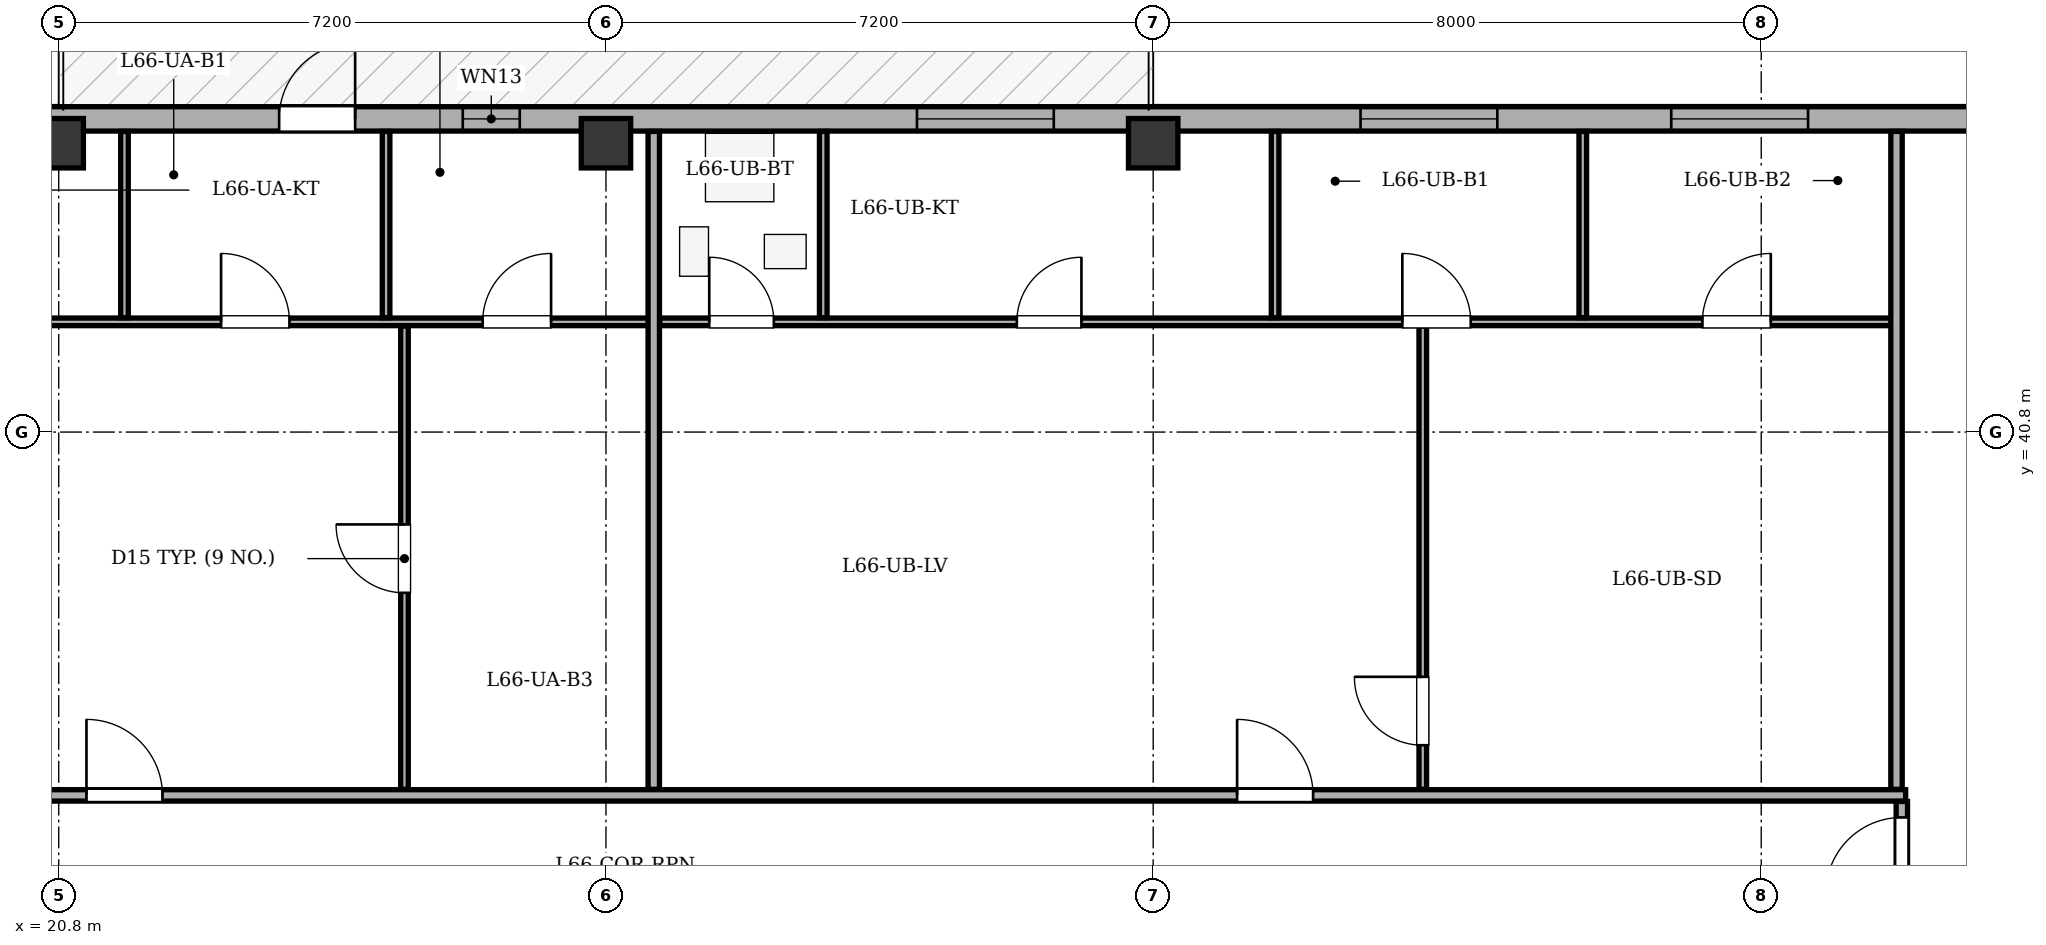
"""IFC4 building model, lengths in metres.
Left out: names, types, materials, properties, quantities, classifications, styles, units other than length and angle.
Written with IfcOpenShell. Run it as: python <this file> out.ifc"""

import sys

from ifc_helpers import new_model, si_unit, direction, frame, frame_2d, origin, origin_2d, place, context, subcontext, project, spatial, rectangle, extrude, element, fill, save


model = new_model("IFC4")
c1 = context("Model", 3, precision=1e-05, world=origin(), true_north=direction((0.0, 1.0)))
c2 = subcontext(c1, "Body", "Model", "MODEL_VIEW")
j1 = project(units=[si_unit("LENGTHUNIT", "METRE"), si_unit("PLANEANGLEUNIT", "RADIAN")], contexts=[c1])
p1 = place(None, origin())
s1 = spatial("IfcSite", under=j1, at=p1, CompositionType="ELEMENT")
p2 = place(p1, origin())
s2 = spatial("IfcBuilding", under=s1, at=p2, CompositionType="ELEMENT")
p3 = place(p2, frame((0.0, 0.0, 251.7)))
s3 = spatial("IfcBuildingStorey", under=s2, at=p3, CompositionType="ELEMENT", Elevation=251.7)
for number, where, z_axis, x_axis in (
    (1, (20.8, 44.6, 0.0), (0.0, 0.0, 1.0), (1.0, 0.0, 0.0)),
    (2, (28.0, 44.6, 0.0), (0.0, 0.0, 1.0), (1.0, 0.0, 0.0)),
    (3, (35.2, 44.6, 0.0), (0.0, 0.0, 1.0), (1.0, 0.0, 0.0)),
):
    element("IfcColumn", number, at=place(p3, frame(where, z_axis=z_axis, x_axis=x_axis)), inside=s3, PredefinedType="COLUMN", context=c2, shape_type="SweptSolid", body=[
        extrude(rectangle(XDim=0.65, YDim=0.65, at=origin_2d()), origin(), (0.0, 0.0, 1.0), 3.4),
    ])
p4 = place(p3, frame((14.7, 44.92, 0.0), z_axis=(0.0, 0.0, 1.0), x_axis=(1.0, 0.0, 0.0)))
e4 = element("IfcWall", 4, at=p4, inside=s3, PredefinedType="STANDARD", context=c2, shape_type="SweptSolid", body=[
    extrude(rectangle(XDim=37.0, YDim=0.32, at=frame_2d((18.5, 0.0))), origin(), (0.0, 0.0, 1.0), 2.725),
])
p5 = place(p4, frame((9.0, 0.0, 0.0)))
e5 = element("IfcOpeningElement", 5, at=p5, cuts=e4, PredefinedType="OPENING", context=c2, shape_type="SweptSolid", body=[
    extrude(rectangle(XDim=1.0, YDim=2.02, at=frame_2d((0.5, 1.01))), frame((0.0, 0.17, 0.0), z_axis=(0.0, -1.0, 0.0), x_axis=(1.0, 0.0, 0.0)), (0.0, 0.0, 1.0), 0.34),
])
p6 = place(p4, frame((3.228, 0.0, 0.75)))
e6 = element("IfcOpeningElement", 6, at=p6, cuts=e4, PredefinedType="OPENING", context=c2, shape_type="SweptSolid", body=[
    extrude(rectangle(XDim=1.8, YDim=1.7, at=frame_2d((0.9, 0.85))), frame((0.0, 0.17, 0.0), z_axis=(0.0, -1.0, 0.0), x_axis=(1.0, 0.0, 0.0)), (0.0, 0.0, 1.0), 0.34),
])
p7 = place(p4, frame((17.392, 0.0, 0.75)))
e7 = element("IfcOpeningElement", 7, at=p7, cuts=e4, PredefinedType="OPENING", context=c2, shape_type="SweptSolid", body=[
    extrude(rectangle(XDim=1.8, YDim=1.7, at=frame_2d((0.9, 0.85))), frame((0.0, 0.17, 0.0), z_axis=(0.0, -1.0, 0.0), x_axis=(1.0, 0.0, 0.0)), (0.0, 0.0, 1.0), 0.34),
])
p8 = place(p4, frame((23.228, 0.0, 0.75)))
e8 = element("IfcOpeningElement", 8, at=p8, cuts=e4, PredefinedType="OPENING", context=c2, shape_type="SweptSolid", body=[
    extrude(rectangle(XDim=1.8, YDim=1.7, at=frame_2d((0.9, 0.85))), frame((0.0, 0.17, 0.0), z_axis=(0.0, -1.0, 0.0), x_axis=(1.0, 0.0, 0.0)), (0.0, 0.0, 1.0), 0.34),
])
p9 = place(p4, frame((27.316, 0.0, 0.75)))
e9 = element("IfcOpeningElement", 9, at=p9, cuts=e4, PredefinedType="OPENING", context=c2, shape_type="SweptSolid", body=[
    extrude(rectangle(XDim=1.8, YDim=1.7, at=frame_2d((0.9, 0.85))), frame((0.0, 0.17, 0.0), z_axis=(0.0, -1.0, 0.0), x_axis=(1.0, 0.0, 0.0)), (0.0, 0.0, 1.0), 0.34),
])
p10 = place(p4, frame((31.315, 0.0, 0.75)))
e10 = element("IfcOpeningElement", 10, at=p10, cuts=e4, PredefinedType="OPENING", context=c2, shape_type="SweptSolid", body=[
    extrude(rectangle(XDim=1.8, YDim=1.7, at=frame_2d((0.9, 0.85))), frame((0.0, 0.17, 0.0), z_axis=(0.0, -1.0, 0.0), x_axis=(1.0, 0.0, 0.0)), (0.0, 0.0, 1.0), 0.34),
])
p11 = place(p4, frame((33.965, 0.0, 0.75)))
e11 = element("IfcOpeningElement", 11, at=p11, cuts=e4, PredefinedType="OPENING", context=c2, shape_type="SweptSolid", body=[
    extrude(rectangle(XDim=1.8, YDim=1.7, at=frame_2d((0.9, 0.85))), frame((0.0, 0.17, 0.0), z_axis=(0.0, -1.0, 0.0), x_axis=(1.0, 0.0, 0.0)), (0.0, 0.0, 1.0), 0.34),
])
p12 = place(p4, frame((11.416, 0.0, 0.75)))
e12 = element("IfcOpeningElement", 12, at=p12, cuts=e4, PredefinedType="OPENING", context=c2, shape_type="SweptSolid", body=[
    extrude(rectangle(XDim=0.75, YDim=1.45, at=frame_2d((0.375, 0.725))), frame((0.0, 0.17, 0.0), z_axis=(0.0, -1.0, 0.0), x_axis=(1.0, 0.0, 0.0)), (0.0, 0.0, 1.0), 0.34),
])
p13 = place(p3, frame((14.58, 36.02, 0.0), z_axis=(0.0, 0.0, 1.0), x_axis=(1.0, 0.0, 0.0)))
e13 = element("IfcWall", 13, at=p13, inside=s3, PredefinedType="PARTITIONING", context=c2, shape_type="SweptSolid", body=[
    extrude(rectangle(XDim=30.52, YDim=0.15, at=frame_2d((15.26, 0.0))), origin(), (0.0, 0.0, 1.0), 3.1),
])
p14 = place(p13, frame((6.585, 0.0, 0.0)))
e14 = element("IfcOpeningElement", 14, at=p14, cuts=e13, PredefinedType="OPENING", context=c2, shape_type="SweptSolid", body=[
    extrude(rectangle(XDim=1.0, YDim=2.1, at=frame_2d((0.5, 1.05))), frame((0.0, 0.085, 0.0), z_axis=(0.0, -1.0, 0.0), x_axis=(1.0, 0.0, 0.0)), (0.0, 0.0, 1.0), 0.17),
])
p15 = place(p13, frame((21.724, 0.0, 0.0)))
e15 = element("IfcOpeningElement", 15, at=p15, cuts=e13, PredefinedType="OPENING", context=c2, shape_type="SweptSolid", body=[
    extrude(rectangle(XDim=1.0, YDim=2.1, at=frame_2d((0.5, 1.05))), frame((0.0, 0.085, 0.0), z_axis=(0.0, -1.0, 0.0), x_axis=(1.0, 0.0, 0.0)), (0.0, 0.0, 1.0), 0.17),
])
p16 = place(p3, frame((14.78, 42.25, 0.0), z_axis=(0.0, 0.0, 1.0), x_axis=(1.0, 0.0, 0.0)))
e16 = element("IfcWall", 16, at=p16, inside=s3, PredefinedType="PARTITIONING", context=c2, shape_type="SweptSolid", body=[
    extrude(rectangle(XDim=13.889, YDim=0.1, at=frame_2d((6.944, 0.0))), origin(), (0.0, 0.0, 1.0), 3.1),
])
p17 = place(p16, frame((0.65, 0.0, 0.0)))
e17 = element("IfcOpeningElement", 17, at=p17, cuts=e16, PredefinedType="OPENING", context=c2, shape_type="SweptSolid", body=[
    extrude(rectangle(XDim=0.85, YDim=2.05, at=frame_2d((0.425, 1.025))), frame((0.0, 0.06, 0.0), z_axis=(0.0, -1.0, 0.0), x_axis=(1.0, 0.0, 0.0)), (0.0, 0.0, 1.0), 0.12),
])
p18 = place(p16, frame((4.093, 0.0, 0.0)))
e18 = element("IfcOpeningElement", 18, at=p18, cuts=e16, PredefinedType="OPENING", context=c2, shape_type="SweptSolid", body=[
    extrude(rectangle(XDim=0.85, YDim=2.05, at=frame_2d((0.425, 1.025))), frame((0.0, 0.06, 0.0), z_axis=(0.0, -1.0, 0.0), x_axis=(1.0, 0.0, 0.0)), (0.0, 0.0, 1.0), 0.12),
])
p19 = place(p16, frame((8.156, 0.0, 0.0)))
e19 = element("IfcOpeningElement", 19, at=p19, cuts=e16, PredefinedType="OPENING", context=c2, shape_type="SweptSolid", body=[
    extrude(rectangle(XDim=0.9, YDim=2.05, at=frame_2d((0.45, 1.025))), frame((0.0, 0.06, 0.0), z_axis=(0.0, -1.0, 0.0), x_axis=(1.0, 0.0, 0.0)), (0.0, 0.0, 1.0), 0.12),
])
p20 = place(p16, frame((11.598, 0.0, 0.0)))
e20 = element("IfcOpeningElement", 20, at=p20, cuts=e16, PredefinedType="OPENING", context=c2, shape_type="SweptSolid", body=[
    extrude(rectangle(XDim=0.9, YDim=2.05, at=frame_2d((0.45, 1.025))), frame((0.0, 0.06, 0.0), z_axis=(0.0, -1.0, 0.0), x_axis=(1.0, 0.0, 0.0)), (0.0, 0.0, 1.0), 0.12),
])
p21 = place(p3, frame((25.349, 36.1, 0.0), z_axis=(0.0, 0.0, 1.0), x_axis=(0.0, 1.0, 0.0)))
e21 = element("IfcWall", 21, at=p21, inside=s3, PredefinedType="PARTITIONING", context=c2, shape_type="SweptSolid", body=[
    extrude(rectangle(XDim=6.095, YDim=0.1, at=frame_2d((3.047, 0.0))), origin(), (0.0, 0.0, 1.0), 3.1),
])
p22 = place(p21, frame((2.585, 0.0, 0.0)))
e22 = element("IfcOpeningElement", 22, at=p22, cuts=e21, PredefinedType="OPENING", context=c2, shape_type="SweptSolid", body=[
    extrude(rectangle(XDim=0.9, YDim=2.05, at=frame_2d((0.45, 1.025))), frame((0.0, 0.06, 0.0), z_axis=(0.0, -1.0, 0.0), x_axis=(1.0, 0.0, 0.0)), (0.0, 0.0, 1.0), 0.12),
])
for number, where, z_axis, x_axis in (
    (23, (21.665, 42.305, 0.0), (0.0, 0.0, 1.0), (0.0, 1.0, 0.0)),
    (24, (25.107, 42.305, 0.0), (0.0, 0.0, 1.0), (0.0, 1.0, 0.0)),
):
    element("IfcWall", number, at=place(p3, frame(where, z_axis=z_axis, x_axis=x_axis)), inside=s3, PredefinedType="PARTITIONING", context=c2, shape_type="SweptSolid", body=[
        extrude(rectangle(XDim=2.45, YDim=0.1, at=frame_2d((1.225, 0.0))), origin(), (0.0, 0.0, 1.0), 3.1),
    ])
p23 = place(p3, frame((28.629, 36.1, 0.0), z_axis=(0.0, 0.0, 1.0), x_axis=(0.0, 1.0, 0.0)))
e25 = element("IfcWall", 25, at=p23, inside=s3, PredefinedType="PARTITIONING", context=c2, shape_type="SweptSolid", body=[
    extrude(rectangle(XDim=8.655, YDim=0.15, at=frame_2d((4.327, 0.0))), origin(), (0.0, 0.0, 1.0), 3.1),
])
p24 = place(p3, frame((28.709, 42.25, 0.0), z_axis=(0.0, 0.0, 1.0), x_axis=(1.0, 0.0, 0.0)))
e26 = element("IfcWall", 26, at=p24, inside=s3, PredefinedType="PARTITIONING", context=c2, shape_type="SweptSolid", body=[
    extrude(rectangle(XDim=16.311, YDim=0.1, at=frame_2d((8.156, 0.0))), origin(), (0.0, 0.0, 1.0), 3.1),
])
p25 = place(p24, frame((0.65, 0.0, 0.0)))
e27 = element("IfcOpeningElement", 27, at=p25, cuts=e26, PredefinedType="OPENING", context=c2, shape_type="SweptSolid", body=[
    extrude(rectangle(XDim=0.85, YDim=2.05, at=frame_2d((0.425, 1.025))), frame((0.0, 0.06, 0.0), z_axis=(0.0, -1.0, 0.0), x_axis=(1.0, 0.0, 0.0)), (0.0, 0.0, 1.0), 0.12),
])
p26 = place(p24, frame((4.697, 0.0, 0.0)))
e28 = element("IfcOpeningElement", 28, at=p26, cuts=e26, PredefinedType="OPENING", context=c2, shape_type="SweptSolid", body=[
    extrude(rectangle(XDim=0.85, YDim=2.05, at=frame_2d((0.425, 1.025))), frame((0.0, 0.06, 0.0), z_axis=(0.0, -1.0, 0.0), x_axis=(1.0, 0.0, 0.0)), (0.0, 0.0, 1.0), 0.12),
])
p27 = place(p24, frame((9.769, 0.0, 0.0)))
e29 = element("IfcOpeningElement", 29, at=p27, cuts=e26, PredefinedType="OPENING", context=c2, shape_type="SweptSolid", body=[
    extrude(rectangle(XDim=0.9, YDim=2.05, at=frame_2d((0.45, 1.025))), frame((0.0, 0.06, 0.0), z_axis=(0.0, -1.0, 0.0), x_axis=(1.0, 0.0, 0.0)), (0.0, 0.0, 1.0), 0.12),
])
p28 = place(p24, frame((13.717, 0.0, 0.0)))
e30 = element("IfcOpeningElement", 30, at=p28, cuts=e26, PredefinedType="OPENING", context=c2, shape_type="SweptSolid", body=[
    extrude(rectangle(XDim=0.9, YDim=2.05, at=frame_2d((0.45, 1.025))), frame((0.0, 0.06, 0.0), z_axis=(0.0, -1.0, 0.0), x_axis=(1.0, 0.0, 0.0)), (0.0, 0.0, 1.0), 0.12),
])
p29 = place(p3, frame((38.747, 36.1, 0.0), z_axis=(0.0, 0.0, 1.0), x_axis=(0.0, 1.0, 0.0)))
e31 = element("IfcWall", 31, at=p29, inside=s3, PredefinedType="PARTITIONING", context=c2, shape_type="SweptSolid", body=[
    extrude(rectangle(XDim=6.095, YDim=0.1, at=frame_2d((3.047, 0.0))), origin(), (0.0, 0.0, 1.0), 3.1),
])
p30 = place(p29, frame((0.58, 0.0, 0.0)))
e32 = element("IfcOpeningElement", 32, at=p30, cuts=e31, PredefinedType="OPENING", context=c2, shape_type="SweptSolid", body=[
    extrude(rectangle(XDim=0.9, YDim=2.05, at=frame_2d((0.45, 1.025))), frame((0.0, 0.06, 0.0), z_axis=(0.0, -1.0, 0.0), x_axis=(1.0, 0.0, 0.0)), (0.0, 0.0, 1.0), 0.12),
])
for number, where, z_axis, x_axis in (
    (33, (30.859, 42.305, 0.0), (0.0, 0.0, 1.0), (0.0, 1.0, 0.0)),
    (34, (36.804, 42.305, 0.0), (0.0, 0.0, 1.0), (0.0, 1.0, 0.0)),
    (35, (40.852, 42.305, 0.0), (0.0, 0.0, 1.0), (0.0, 1.0, 0.0)),
):
    element("IfcWall", number, at=place(p3, frame(where, z_axis=z_axis, x_axis=x_axis)), inside=s3, PredefinedType="PARTITIONING", context=c2, shape_type="SweptSolid", body=[
        extrude(rectangle(XDim=2.45, YDim=0.1, at=frame_2d((1.225, 0.0))), origin(), (0.0, 0.0, 1.0), 3.1),
    ])
p31 = place(p3, frame((44.98, 36.1, 0.0), z_axis=(0.0, 0.0, 1.0), x_axis=(0.0, 1.0, 0.0)))
e36 = element("IfcWall", 36, at=p31, inside=s3, PredefinedType="PARTITIONING", context=c2, shape_type="SweptSolid", body=[
    extrude(rectangle(XDim=8.655, YDim=0.15, at=frame_2d((4.327, 0.0))), origin(), (0.0, 0.0, 1.0), 2.725),
])
p32 = place(p3, frame((45.05, 34.15, 0.0), z_axis=(0.0, 0.0, 1.0), x_axis=(0.0, 1.0, 0.0)))
e37 = element("IfcWall", 37, at=p32, inside=s3, PredefinedType="PARTITIONING", context=c2, shape_type="SweptSolid", body=[
    extrude(rectangle(XDim=1.79, YDim=0.15, at=frame_2d((0.895, 0.0))), origin(), (0.0, 0.0, 1.0), 2.725),
])
p33 = place(p32, frame((0.58, 0.0, 0.0)))
e38 = element("IfcOpeningElement", 38, at=p33, cuts=e37, PredefinedType="OPENING", context=c2, shape_type="SweptSolid", body=[
    extrude(rectangle(XDim=1.0, YDim=2.1, at=frame_2d((0.5, 1.05))), frame((0.0, 0.085, 0.0), z_axis=(0.0, -1.0, 0.0), x_axis=(1.0, 0.0, 0.0)), (0.0, 0.0, 1.0), 0.17),
])
p34 = place(p5, origin())
e39 = element("IfcDoor", 39, at=p34, inside=s3, OperationType="SINGLE_SWING_RIGHT", PredefinedType="DOOR", context=c2, shape_type="SweptSolid", body=[
    extrude(rectangle(XDim=1.0, YDim=2.02, at=frame_2d((0.5, 1.01))), frame((0.0, 0.025, 0.0), z_axis=(0.0, -1.0, 0.0), x_axis=(1.0, 0.0, 0.0)), (0.0, 0.0, 1.0), 0.05),
])
fill(e5, e39)
p35 = place(p7, origin())
e40 = element("IfcWindow", 40, at=p35, inside=s3, PartitioningType="SINGLE_PANEL", PredefinedType="WINDOW", context=c2, shape_type="SweptSolid", body=[
    extrude(rectangle(XDim=1.8, YDim=1.7, at=frame_2d((0.9, 0.85))), frame((0.0, -0.01, 0.0), z_axis=(0.0, -1.0, 0.0), x_axis=(1.0, 0.0, 0.0)), (0.0, 0.0, 1.0), 0.06),
])
fill(e7, e40)
p36 = place(p8, origin())
e41 = element("IfcWindow", 41, at=p36, inside=s3, PartitioningType="SINGLE_PANEL", PredefinedType="WINDOW", context=c2, shape_type="SweptSolid", body=[
    extrude(rectangle(XDim=1.8, YDim=1.7, at=frame_2d((0.9, 0.85))), frame((0.0, -0.01, 0.0), z_axis=(0.0, -1.0, 0.0), x_axis=(1.0, 0.0, 0.0)), (0.0, 0.0, 1.0), 0.06),
])
fill(e8, e41)
p37 = place(p9, origin())
e42 = element("IfcWindow", 42, at=p37, inside=s3, PartitioningType="SINGLE_PANEL", PredefinedType="WINDOW", context=c2, shape_type="SweptSolid", body=[
    extrude(rectangle(XDim=1.8, YDim=1.7, at=frame_2d((0.9, 0.85))), frame((0.0, -0.01, 0.0), z_axis=(0.0, -1.0, 0.0), x_axis=(1.0, 0.0, 0.0)), (0.0, 0.0, 1.0), 0.06),
])
fill(e9, e42)
p38 = place(p12, origin())
e43 = element("IfcWindow", 43, at=p38, inside=s3, PartitioningType="SINGLE_PANEL", PredefinedType="WINDOW", context=c2, shape_type="SweptSolid", body=[
    extrude(rectangle(XDim=0.75, YDim=1.45, at=frame_2d((0.375, 0.725))), frame((0.0, -0.01, 0.0), z_axis=(0.0, -1.0, 0.0), x_axis=(1.0, 0.0, 0.0)), (0.0, 0.0, 1.0), 0.06),
])
fill(e12, e43)
p39 = place(p14, origin())
e44 = element("IfcDoor", 44, at=p39, inside=s3, OperationType="SINGLE_SWING_LEFT", PredefinedType="DOOR", context=c2, shape_type="SweptSolid", body=[
    extrude(rectangle(XDim=1.0, YDim=2.1, at=frame_2d((0.5, 1.05))), frame((0.0, 0.025, 0.0), z_axis=(0.0, -1.0, 0.0), x_axis=(1.0, 0.0, 0.0)), (0.0, 0.0, 1.0), 0.05),
])
fill(e14, e44)
p40 = place(p15, origin())
e45 = element("IfcDoor", 45, at=p40, inside=s3, OperationType="SINGLE_SWING_LEFT", PredefinedType="DOOR", context=c2, shape_type="SweptSolid", body=[
    extrude(rectangle(XDim=1.0, YDim=2.1, at=frame_2d((0.5, 1.05))), frame((0.0, 0.025, 0.0), z_axis=(0.0, -1.0, 0.0), x_axis=(1.0, 0.0, 0.0)), (0.0, 0.0, 1.0), 0.05),
])
fill(e15, e45)
p41 = place(p22, origin())
e46 = element("IfcDoor", 46, at=p41, inside=s3, OperationType="SINGLE_SWING_RIGHT", PredefinedType="DOOR", context=c2, shape_type="SweptSolid", body=[
    extrude(rectangle(XDim=0.9, YDim=2.05, at=frame_2d((0.45, 1.025))), frame((0.0, 0.025, 0.0), z_axis=(0.0, -1.0, 0.0), x_axis=(1.0, 0.0, 0.0)), (0.0, 0.0, 1.0), 0.05),
])
fill(e22, e46)
p42 = place(p19, origin())
e47 = element("IfcDoor", 47, at=p42, inside=s3, OperationType="SINGLE_SWING_LEFT", PredefinedType="DOOR", context=c2, shape_type="SweptSolid", body=[
    extrude(rectangle(XDim=0.9, YDim=2.05, at=frame_2d((0.45, 1.025))), frame((0.0, 0.025, 0.0), z_axis=(0.0, -1.0, 0.0), x_axis=(1.0, 0.0, 0.0)), (0.0, 0.0, 1.0), 0.05),
])
fill(e19, e47)
p43 = place(p20, origin())
e48 = element("IfcDoor", 48, at=p43, inside=s3, OperationType="SINGLE_SWING_RIGHT", PredefinedType="DOOR", context=c2, shape_type="SweptSolid", body=[
    extrude(rectangle(XDim=0.9, YDim=2.05, at=frame_2d((0.45, 1.025))), frame((0.0, 0.025, 0.0), z_axis=(0.0, -1.0, 0.0), x_axis=(1.0, 0.0, 0.0)), (0.0, 0.0, 1.0), 0.05),
])
fill(e20, e48)
p44 = place(p30, origin())
e49 = element("IfcDoor", 49, at=p44, inside=s3, OperationType="SINGLE_SWING_RIGHT", PredefinedType="DOOR", context=c2, shape_type="SweptSolid", body=[
    extrude(rectangle(XDim=0.9, YDim=2.05, at=frame_2d((0.45, 1.025))), frame((0.0, 0.025, 0.0), z_axis=(0.0, -1.0, 0.0), x_axis=(1.0, 0.0, 0.0)), (0.0, 0.0, 1.0), 0.05),
])
fill(e32, e49)
p45 = place(p25, origin())
e50 = element("IfcDoor", 50, at=p45, inside=s3, OperationType="SINGLE_SWING_LEFT", PredefinedType="DOOR", context=c2, shape_type="SweptSolid", body=[
    extrude(rectangle(XDim=0.85, YDim=2.05, at=frame_2d((0.425, 1.025))), frame((0.0, 0.025, 0.0), z_axis=(0.0, -1.0, 0.0), x_axis=(1.0, 0.0, 0.0)), (0.0, 0.0, 1.0), 0.05),
])
fill(e27, e50)
p46 = place(p26, origin())
e51 = element("IfcDoor", 51, at=p46, inside=s3, OperationType="SINGLE_SWING_RIGHT", PredefinedType="DOOR", context=c2, shape_type="SweptSolid", body=[
    extrude(rectangle(XDim=0.85, YDim=2.05, at=frame_2d((0.425, 1.025))), frame((0.0, 0.025, 0.0), z_axis=(0.0, -1.0, 0.0), x_axis=(1.0, 0.0, 0.0)), (0.0, 0.0, 1.0), 0.05),
])
fill(e28, e51)
p47 = place(p27, origin())
e52 = element("IfcDoor", 52, at=p47, inside=s3, OperationType="SINGLE_SWING_LEFT", PredefinedType="DOOR", context=c2, shape_type="SweptSolid", body=[
    extrude(rectangle(XDim=0.9, YDim=2.05, at=frame_2d((0.45, 1.025))), frame((0.0, 0.025, 0.0), z_axis=(0.0, -1.0, 0.0), x_axis=(1.0, 0.0, 0.0)), (0.0, 0.0, 1.0), 0.05),
])
fill(e29, e52)
p48 = place(p28, origin())
e53 = element("IfcDoor", 53, at=p48, inside=s3, OperationType="SINGLE_SWING_RIGHT", PredefinedType="DOOR", context=c2, shape_type="SweptSolid", body=[
    extrude(rectangle(XDim=0.9, YDim=2.05, at=frame_2d((0.45, 1.025))), frame((0.0, 0.025, 0.0), z_axis=(0.0, -1.0, 0.0), x_axis=(1.0, 0.0, 0.0)), (0.0, 0.0, 1.0), 0.05),
])
fill(e30, e53)
p49 = place(p33, origin())
e54 = element("IfcDoor", 54, at=p49, inside=s3, OperationType="SINGLE_SWING_LEFT", PredefinedType="DOOR", context=c2, shape_type="SweptSolid", body=[
    extrude(rectangle(XDim=1.0, YDim=2.1, at=frame_2d((0.5, 1.05))), frame((0.0, 0.025, 0.0), z_axis=(0.0, -1.0, 0.0), x_axis=(1.0, 0.0, 0.0)), (0.0, 0.0, 1.0), 0.05),
])
fill(e38, e54)
save(model, sys.argv[1])
